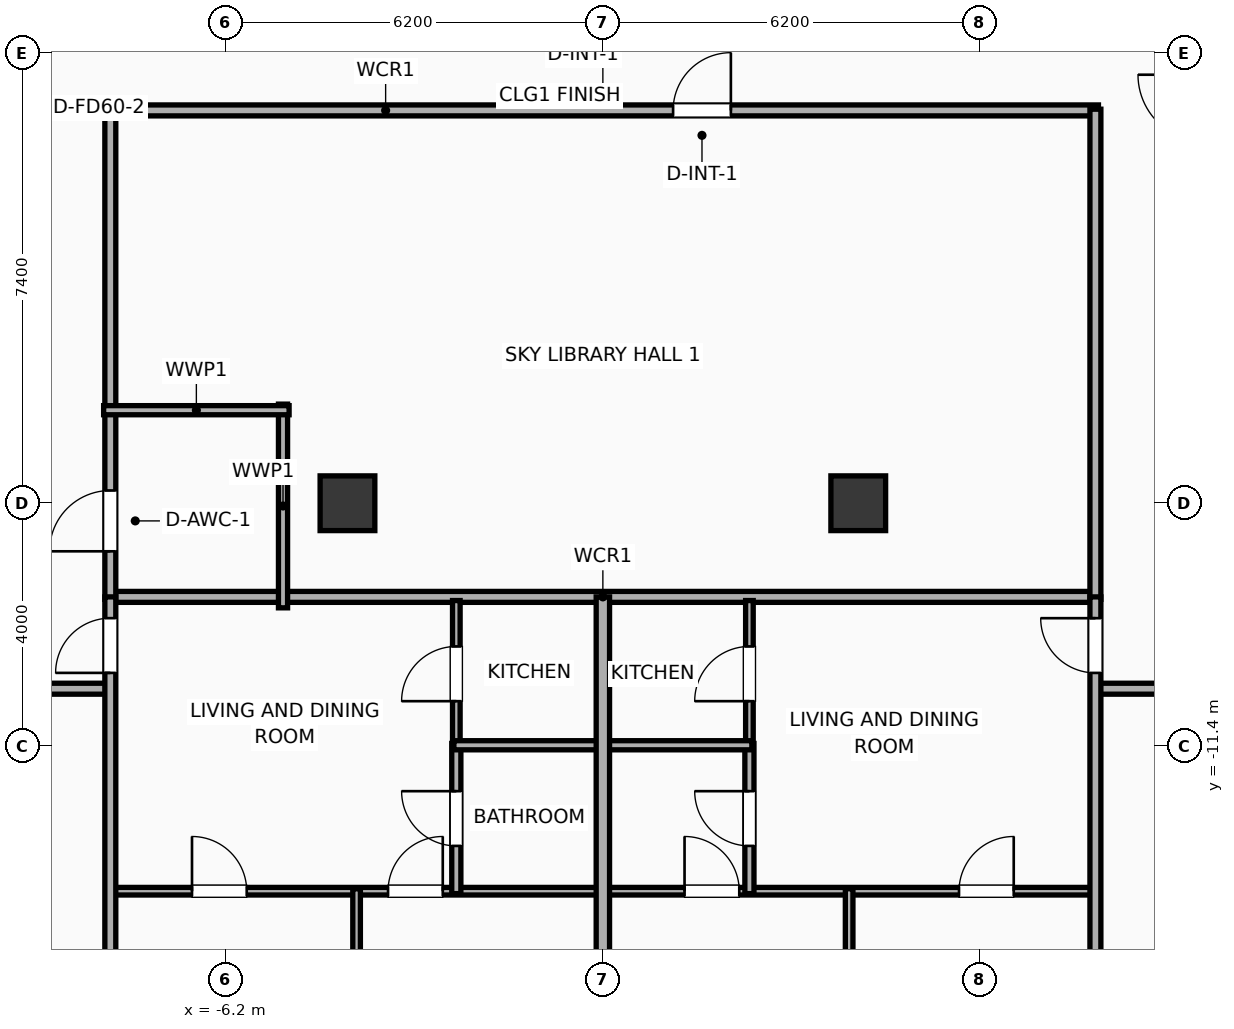
"""IFC4 building model, lengths in metres.
Left out: names, types, materials, properties, quantities, classifications, styles, units other than length and angle.
Written with IfcOpenShell. Run it as: python <this file> out.ifc"""

import sys

from ifc_helpers import new_model, si_unit, direction, frame, frame_2d, origin, origin_2d, place, context, subcontext, project, spatial, rectangle, extrude, element, fill, save


model = new_model("IFC4")
c1 = context("Model", 3, precision=1e-05, world=origin(), true_north=direction((0.0, 1.0)))
c2 = subcontext(c1, "Body", "Model", "MODEL_VIEW")
j1 = project(units=[si_unit("LENGTHUNIT", "METRE"), si_unit("PLANEANGLEUNIT", "RADIAN")], contexts=[c1])
p1 = place(None, origin())
s1 = spatial("IfcSite", under=j1, at=p1, CompositionType="ELEMENT")
p2 = place(p1, origin())
s2 = spatial("IfcBuilding", under=s1, at=p2, CompositionType="ELEMENT")
p3 = place(p2, frame((0.0, 0.0, 159.9)))
s3 = spatial("IfcBuildingStorey", under=s2, at=p3, CompositionType="ELEMENT", Elevation=159.9)
for number, where, z_axis, x_axis in (
    (1, (-4.2, -7.4, 0.0), (0.0, 0.0, 1.0), (1.0, 0.0, 0.0)),
    (2, (4.2, -7.4, 0.0), (0.0, 0.0, 1.0), (1.0, 0.0, 0.0)),
):
    element("IfcColumn", number, at=place(p3, frame(where, z_axis=z_axis, x_axis=x_axis)), inside=s3, PredefinedType="COLUMN", context=c2, shape_type="SweptSolid", body=[
        extrude(rectangle(XDim=0.9, YDim=0.9, at=origin_2d()), origin(), (0.0, 0.0, 1.0), 3.9),
    ])
p4 = place(p3, frame((-8.15, -8.94, 0.0), z_axis=(0.0, 0.0, 1.0), x_axis=(1.0, 0.0, 0.0)))
e3 = element("IfcWall", 3, at=p4, inside=s3, PredefinedType="PARTITIONING", context=c2, shape_type="SweptSolid", body=[
    extrude(rectangle(XDim=16.3, YDim=0.18, at=frame_2d((8.15, 0.0))), origin(), (0.0, 0.0, 1.0), 3.65),
])
p5 = place(p3, frame((-8.15, -0.94, 0.0), z_axis=(0.0, 0.0, 1.0), x_axis=(1.0, 0.0, 0.0)))
e4 = element("IfcWall", 4, at=p5, inside=s3, PredefinedType="PARTITIONING", context=c2, shape_type="SweptSolid", body=[
    extrude(rectangle(XDim=16.3, YDim=0.18, at=frame_2d((8.15, 0.0))), origin(), (0.0, 0.0, 1.0), 3.65),
])
p6 = place(p5, frame((9.305, 0.0, 0.0)))
e5 = element("IfcOpeningElement", 5, at=p6, cuts=e4, PredefinedType="OPENING", context=c2, shape_type="SweptSolid", body=[
    extrude(rectangle(XDim=0.95, YDim=2.05, at=frame_2d((0.475, 1.025))), frame((0.0, 0.1, 0.0), z_axis=(0.0, -1.0, 0.0), x_axis=(1.0, 0.0, 0.0)), (0.0, 0.0, 1.0), 0.2),
])
p7 = place(p3, frame((-8.1, -8.98, 0.0), z_axis=(0.0, 0.0, 1.0), x_axis=(0.0, 1.0, 0.0)))
e6 = element("IfcWall", 6, at=p7, inside=s3, PredefinedType="PARTITIONING", context=c2, shape_type="SweptSolid", body=[
    extrude(rectangle(XDim=8.06, YDim=0.18, at=frame_2d((4.03, 0.0))), origin(), (0.0, 0.0, 1.0), 3.65),
])
p8 = place(p7, frame((0.79, 0.0, 0.0)))
e7 = element("IfcOpeningElement", 7, at=p8, cuts=e6, PredefinedType="OPENING", context=c2, shape_type="SweptSolid", body=[
    extrude(rectangle(XDim=1.0, YDim=2.05, at=frame_2d((0.5, 1.025))), frame((0.0, 0.1, 0.0), z_axis=(0.0, -1.0, 0.0), x_axis=(1.0, 0.0, 0.0)), (0.0, 0.0, 1.0), 0.2),
])
p9 = place(p3, frame((8.1, -8.98, 0.0), z_axis=(0.0, 0.0, 1.0), x_axis=(0.0, 1.0, 0.0)))
e8 = element("IfcWall", 8, at=p9, inside=s3, PredefinedType="PARTITIONING", context=c2, shape_type="SweptSolid", body=[
    extrude(rectangle(XDim=8.06, YDim=0.18, at=frame_2d((4.03, 0.0))), origin(), (0.0, 0.0, 1.0), 3.65),
])
p10 = place(p3, frame((-5.26, -9.12, 0.0), z_axis=(0.0, 0.0, 1.0), x_axis=(0.0, 1.0, 0.0)))
e9 = element("IfcWall", 9, at=p10, inside=s3, PredefinedType="PLUMBINGWALL", context=c2, shape_type="SweptSolid", body=[
    extrude(rectangle(XDim=3.35, YDim=0.15, at=frame_2d((1.675, 0.0))), origin(), (0.0, 0.0, 1.0), 3.65),
])
p11 = place(p3, frame((-8.21, -5.87, 0.0), z_axis=(0.0, 0.0, 1.0), x_axis=(1.0, 0.0, 0.0)))
e10 = element("IfcWall", 10, at=p11, inside=s3, PredefinedType="PLUMBINGWALL", context=c2, shape_type="SweptSolid", body=[
    extrude(rectangle(XDim=3.05, YDim=0.15, at=frame_2d((1.525, 0.0))), origin(), (0.0, 0.0, 1.0), 3.65),
])
p12 = place(p3, frame((-19.75, -10.45, 0.0), z_axis=(0.0, 0.0, 1.0), x_axis=(1.0, 0.0, 0.0)))
e11 = element("IfcWall", 11, at=p12, inside=s3, PredefinedType="PARTITIONING", context=c2, shape_type="SweptSolid", body=[
    extrude(rectangle(XDim=11.67, YDim=0.18, at=frame_2d((5.835, 0.0))), origin(), (0.0, 0.0, 1.0), 3.65),
])
p13 = place(p12, frame((2.664, 0.0, 0.0)))
e12 = element("IfcOpeningElement", 12, at=p13, cuts=e11, PredefinedType="OPENING", context=c2, shape_type="SweptSolid", body=[
    extrude(rectangle(XDim=0.9, YDim=2.05, at=frame_2d((0.45, 1.025))), frame((0.0, 0.1, 0.0), z_axis=(0.0, -1.0, 0.0), x_axis=(1.0, 0.0, 0.0)), (0.0, 0.0, 1.0), 0.2),
])
p14 = place(p12, frame((9.404, 0.0, 0.0)))
e13 = element("IfcOpeningElement", 13, at=p14, cuts=e11, PredefinedType="OPENING", context=c2, shape_type="SweptSolid", body=[
    extrude(rectangle(XDim=1.15, YDim=2.05, at=frame_2d((0.575, 1.025))), frame((0.0, 0.1, 0.0), z_axis=(0.0, -1.0, 0.0), x_axis=(1.0, 0.0, 0.0)), (0.0, 0.0, 1.0), 0.2),
])
p15 = place(p3, frame((8.08, -10.45, 0.0), z_axis=(0.0, 0.0, 1.0), x_axis=(1.0, 0.0, 0.0)))
e14 = element("IfcWall", 14, at=p15, inside=s3, PredefinedType="PARTITIONING", context=c2, shape_type="SweptSolid", body=[
    extrude(rectangle(XDim=11.67, YDim=0.18, at=frame_2d((5.835, 0.0))), origin(), (0.0, 0.0, 1.0), 3.65),
])
p16 = place(p15, frame((1.213, 0.0, 0.0)))
e15 = element("IfcOpeningElement", 15, at=p16, cuts=e14, PredefinedType="OPENING", context=c2, shape_type="SweptSolid", body=[
    extrude(rectangle(XDim=1.15, YDim=2.05, at=frame_2d((0.575, 1.025))), frame((0.0, 0.1, 0.0), z_axis=(0.0, -1.0, 0.0), x_axis=(1.0, 0.0, 0.0)), (0.0, 0.0, 1.0), 0.2),
])
p17 = place(p15, frame((7.057, 0.0, 0.0)))
e16 = element("IfcOpeningElement", 16, at=p17, cuts=e14, PredefinedType="OPENING", context=c2, shape_type="SweptSolid", body=[
    extrude(rectangle(XDim=1.15, YDim=2.05, at=frame_2d((0.575, 1.025))), frame((0.0, 0.1, 0.0), z_axis=(0.0, -1.0, 0.0), x_axis=(1.0, 0.0, 0.0)), (0.0, 0.0, 1.0), 0.2),
])
p18 = place(p3, frame((-8.08, -13.78, 0.0), z_axis=(0.0, 0.0, 1.0), x_axis=(1.0, 0.0, 0.0)))
e17 = element("IfcWall", 17, at=p18, inside=s3, PredefinedType="PARTITIONING", context=c2, shape_type="SweptSolid", body=[
    extrude(rectangle(XDim=8.06, YDim=0.125, at=frame_2d((4.03, 0.0))), origin(), (0.0, 0.0, 1.0), 3.65),
])
p19 = place(p18, frame((1.323, 0.0, 0.0)))
e18 = element("IfcOpeningElement", 18, at=p19, cuts=e17, PredefinedType="OPENING", context=c2, shape_type="SweptSolid", body=[
    extrude(rectangle(XDim=0.9, YDim=2.05, at=frame_2d((0.45, 1.025))), frame((0.0, 0.073, 0.0), z_axis=(0.0, -1.0, 0.0), x_axis=(1.0, 0.0, 0.0)), (0.0, 0.0, 1.0), 0.145),
])
p20 = place(p18, frame((4.547, 0.0, 0.0)))
e19 = element("IfcOpeningElement", 19, at=p20, cuts=e17, PredefinedType="OPENING", context=c2, shape_type="SweptSolid", body=[
    extrude(rectangle(XDim=0.9, YDim=2.05, at=frame_2d((0.45, 1.025))), frame((0.0, 0.073, 0.0), z_axis=(0.0, -1.0, 0.0), x_axis=(1.0, 0.0, 0.0)), (0.0, 0.0, 1.0), 0.145),
])
p21 = place(p3, frame((-2.41, -11.41, 0.0), z_axis=(0.0, 0.0, 1.0), x_axis=(0.0, 1.0, 0.0)))
e20 = element("IfcWall", 20, at=p21, inside=s3, PredefinedType="PARTITIONING", context=c2, shape_type="SweptSolid", body=[
    extrude(rectangle(XDim=2.41, YDim=0.125, at=frame_2d((1.205, 0.0))), origin(), (0.0, 0.0, 1.0), 3.65),
])
p22 = place(p21, frame((0.755, 0.0, 0.0)))
e21 = element("IfcOpeningElement", 21, at=p22, cuts=e20, PredefinedType="OPENING", context=c2, shape_type="SweptSolid", body=[
    extrude(rectangle(XDim=0.9, YDim=2.05, at=frame_2d((0.45, 1.025))), frame((0.0, 0.073, 0.0), z_axis=(0.0, -1.0, 0.0), x_axis=(1.0, 0.0, 0.0)), (0.0, 0.0, 1.0), 0.145),
])
p23 = place(p3, frame((-2.41, -13.82, 0.0), z_axis=(0.0, 0.0, 1.0), x_axis=(0.0, 1.0, 0.0)))
e22 = element("IfcWall", 22, at=p23, inside=s3, PredefinedType="PLUMBINGWALL", context=c2, shape_type="SweptSolid", body=[
    extrude(rectangle(XDim=2.47, YDim=0.15, at=frame_2d((1.235, 0.0))), origin(), (0.0, 0.0, 1.0), 3.65),
])
p24 = place(p23, frame((0.785, 0.0, 0.0)))
e23 = element("IfcOpeningElement", 23, at=p24, cuts=e22, PredefinedType="OPENING", context=c2, shape_type="SweptSolid", body=[
    extrude(rectangle(XDim=0.9, YDim=2.05, at=frame_2d((0.45, 1.025))), frame((0.0, 0.085, 0.0), z_axis=(0.0, -1.0, 0.0), x_axis=(1.0, 0.0, 0.0)), (0.0, 0.0, 1.0), 0.17),
])
p25 = place(p3, frame((-2.45, -11.38, 0.0), z_axis=(0.0, 0.0, 1.0), x_axis=(1.0, 0.0, 0.0)))
e24 = element("IfcWall", 24, at=p25, inside=s3, PredefinedType="PLUMBINGWALL", context=c2, shape_type="SweptSolid", body=[
    extrude(rectangle(XDim=2.43, YDim=0.15, at=frame_2d((1.215, 0.0))), origin(), (0.0, 0.0, 1.0), 3.65),
])
p26 = place(p3, frame((-4.05, -21.031, 0.0), z_axis=(0.0, 0.0, 1.0), x_axis=(0.0, 1.0, 0.0)))
e25 = element("IfcWall", 25, at=p26, inside=s3, PredefinedType="PARTITIONING", context=c2, shape_type="SweptSolid", body=[
    extrude(rectangle(XDim=7.291, YDim=0.125, at=frame_2d((3.646, 0.0))), origin(), (0.0, 0.0, 1.0), 3.65),
])
p27 = place(p3, frame((-8.1, -21.456, 0.0), z_axis=(0.0, 0.0, 1.0), x_axis=(0.0, 1.0, 0.0)))
e26 = element("IfcWall", 26, at=p27, inside=s3, PredefinedType="PARTITIONING", context=c2, shape_type="SweptSolid", body=[
    extrude(rectangle(XDim=12.516, YDim=0.18, at=frame_2d((6.258, 0.0))), origin(), (0.0, 0.0, 1.0), 3.65),
])
p28 = place(p27, frame((11.267, 0.0, 0.0)))
e27 = element("IfcOpeningElement", 27, at=p28, cuts=e26, PredefinedType="OPENING", context=c2, shape_type="SweptSolid", body=[
    extrude(rectangle(XDim=0.9, YDim=2.05, at=frame_2d((0.45, 1.025))), frame((0.0, 0.1, 0.0), z_axis=(0.0, -1.0, 0.0), x_axis=(1.0, 0.0, 0.0)), (0.0, 0.0, 1.0), 0.2),
])
p29 = place(p3, frame((0.02, -13.78, 0.0), z_axis=(0.0, 0.0, 1.0), x_axis=(1.0, 0.0, 0.0)))
e28 = element("IfcWall", 28, at=p29, inside=s3, PredefinedType="PARTITIONING", context=c2, shape_type="SweptSolid", body=[
    extrude(rectangle(XDim=8.06, YDim=0.125, at=frame_2d((4.03, 0.0))), origin(), (0.0, 0.0, 1.0), 3.65),
])
p30 = place(p29, frame((1.323, 0.0, 0.0)))
e29 = element("IfcOpeningElement", 29, at=p30, cuts=e28, PredefinedType="OPENING", context=c2, shape_type="SweptSolid", body=[
    extrude(rectangle(XDim=0.9, YDim=2.05, at=frame_2d((0.45, 1.025))), frame((0.0, 0.073, 0.0), z_axis=(0.0, -1.0, 0.0), x_axis=(1.0, 0.0, 0.0)), (0.0, 0.0, 1.0), 0.145),
])
p31 = place(p29, frame((5.837, 0.0, 0.0)))
e30 = element("IfcOpeningElement", 30, at=p31, cuts=e28, PredefinedType="OPENING", context=c2, shape_type="SweptSolid", body=[
    extrude(rectangle(XDim=0.9, YDim=2.05, at=frame_2d((0.45, 1.025))), frame((0.0, 0.073, 0.0), z_axis=(0.0, -1.0, 0.0), x_axis=(1.0, 0.0, 0.0)), (0.0, 0.0, 1.0), 0.145),
])
p32 = place(p3, frame((2.41, -11.41, 0.0), z_axis=(0.0, 0.0, 1.0), x_axis=(0.0, 1.0, 0.0)))
e31 = element("IfcWall", 31, at=p32, inside=s3, PredefinedType="PARTITIONING", context=c2, shape_type="SweptSolid", body=[
    extrude(rectangle(XDim=2.41, YDim=0.125, at=frame_2d((1.205, 0.0))), origin(), (0.0, 0.0, 1.0), 3.65),
])
p33 = place(p32, frame((0.755, 0.0, 0.0)))
e32 = element("IfcOpeningElement", 32, at=p33, cuts=e31, PredefinedType="OPENING", context=c2, shape_type="SweptSolid", body=[
    extrude(rectangle(XDim=0.9, YDim=2.05, at=frame_2d((0.45, 1.025))), frame((0.0, 0.073, 0.0), z_axis=(0.0, -1.0, 0.0), x_axis=(1.0, 0.0, 0.0)), (0.0, 0.0, 1.0), 0.145),
])
p34 = place(p3, frame((2.41, -13.82, 0.0), z_axis=(0.0, 0.0, 1.0), x_axis=(0.0, 1.0, 0.0)))
e33 = element("IfcWall", 33, at=p34, inside=s3, PredefinedType="PLUMBINGWALL", context=c2, shape_type="SweptSolid", body=[
    extrude(rectangle(XDim=2.47, YDim=0.15, at=frame_2d((1.235, 0.0))), origin(), (0.0, 0.0, 1.0), 3.65),
])
p35 = place(p34, frame((0.785, 0.0, 0.0)))
e34 = element("IfcOpeningElement", 34, at=p35, cuts=e33, PredefinedType="OPENING", context=c2, shape_type="SweptSolid", body=[
    extrude(rectangle(XDim=0.9, YDim=2.05, at=frame_2d((0.45, 1.025))), frame((0.0, 0.085, 0.0), z_axis=(0.0, -1.0, 0.0), x_axis=(1.0, 0.0, 0.0)), (0.0, 0.0, 1.0), 0.17),
])
p36 = place(p3, frame((0.02, -11.38, 0.0), z_axis=(0.0, 0.0, 1.0), x_axis=(1.0, 0.0, 0.0)))
e35 = element("IfcWall", 35, at=p36, inside=s3, PredefinedType="PLUMBINGWALL", context=c2, shape_type="SweptSolid", body=[
    extrude(rectangle(XDim=2.43, YDim=0.15, at=frame_2d((1.215, 0.0))), origin(), (0.0, 0.0, 1.0), 3.65),
])
p37 = place(p3, frame((4.05, -20.179, 0.0), z_axis=(0.0, 0.0, 1.0), x_axis=(0.0, 1.0, 0.0)))
e36 = element("IfcWall", 36, at=p37, inside=s3, PredefinedType="PARTITIONING", context=c2, shape_type="SweptSolid", body=[
    extrude(rectangle(XDim=6.439, YDim=0.125, at=frame_2d((3.22, 0.0))), origin(), (0.0, 0.0, 1.0), 3.04),
])
p38 = place(p3, frame((8.1, -19.754, 0.0), z_axis=(0.0, 0.0, 1.0), x_axis=(0.0, 1.0, 0.0)))
e37 = element("IfcWall", 37, at=p38, inside=s3, PredefinedType="PARTITIONING", context=c2, shape_type="SweptSolid", body=[
    extrude(rectangle(XDim=10.814, YDim=0.18, at=frame_2d((5.407, 0.0))), origin(), (0.0, 0.0, 1.0), 3.65),
])
p39 = place(p38, frame((9.564, 0.0, 0.0)))
e38 = element("IfcOpeningElement", 38, at=p39, cuts=e37, PredefinedType="OPENING", context=c2, shape_type="SweptSolid", body=[
    extrude(rectangle(XDim=0.9, YDim=2.05, at=frame_2d((0.45, 1.025))), frame((0.0, 0.1, 0.0), z_axis=(0.0, -1.0, 0.0), x_axis=(1.0, 0.0, 0.0)), (0.0, 0.0, 1.0), 0.2),
])
p40 = place(p3, frame((0.0, -20.605, 0.0), z_axis=(0.0, 0.0, 1.0), x_axis=(0.0, 1.0, 0.0)))
e39 = element("IfcWall", 39, at=p40, inside=s3, PredefinedType="PARTITIONING", context=c2, shape_type="SweptSolid", body=[
    extrude(rectangle(XDim=11.665, YDim=0.22, at=frame_2d((5.833, 0.0))), origin(), (0.0, 0.0, 1.0), 3.65),
])
p41 = place(p6, origin())
e40 = element("IfcDoor", 40, at=p41, inside=s3, OperationType="SINGLE_SWING_RIGHT", PredefinedType="DOOR", context=c2, shape_type="SweptSolid", body=[
    extrude(rectangle(XDim=0.95, YDim=2.05, at=frame_2d((0.475, 1.025))), frame((0.0, 0.025, 0.0), z_axis=(0.0, -1.0, 0.0), x_axis=(1.0, 0.0, 0.0)), (0.0, 0.0, 1.0), 0.05),
])
fill(e5, e40)
p42 = place(p8, origin())
e41 = element("IfcDoor", 41, at=p42, inside=s3, OperationType="SINGLE_SWING_LEFT", PredefinedType="DOOR", context=c2, shape_type="SweptSolid", body=[
    extrude(rectangle(XDim=1.0, YDim=2.05, at=frame_2d((0.5, 1.025))), frame((0.0, 0.025, 0.0), z_axis=(0.0, -1.0, 0.0), x_axis=(1.0, 0.0, 0.0)), (0.0, 0.0, 1.0), 0.05),
])
fill(e7, e41)
p43 = place(p19, origin())
e42 = element("IfcDoor", 42, at=p43, inside=s3, OperationType="SINGLE_SWING_LEFT", PredefinedType="DOOR", context=c2, shape_type="SweptSolid", body=[
    extrude(rectangle(XDim=0.9, YDim=2.05, at=frame_2d((0.45, 1.025))), frame((0.0, 0.025, 0.0), z_axis=(0.0, -1.0, 0.0), x_axis=(1.0, 0.0, 0.0)), (0.0, 0.0, 1.0), 0.05),
])
fill(e18, e42)
p44 = place(p20, origin())
e43 = element("IfcDoor", 43, at=p44, inside=s3, OperationType="SINGLE_SWING_RIGHT", PredefinedType="DOOR", context=c2, shape_type="SweptSolid", body=[
    extrude(rectangle(XDim=0.9, YDim=2.05, at=frame_2d((0.45, 1.025))), frame((0.0, 0.025, 0.0), z_axis=(0.0, -1.0, 0.0), x_axis=(1.0, 0.0, 0.0)), (0.0, 0.0, 1.0), 0.05),
])
fill(e19, e43)
p45 = place(p22, origin())
e44 = element("IfcDoor", 44, at=p45, inside=s3, OperationType="SINGLE_SWING_LEFT", PredefinedType="DOOR", context=c2, shape_type="SweptSolid", body=[
    extrude(rectangle(XDim=0.9, YDim=2.05, at=frame_2d((0.45, 1.025))), frame((0.0, 0.025, 0.0), z_axis=(0.0, -1.0, 0.0), x_axis=(1.0, 0.0, 0.0)), (0.0, 0.0, 1.0), 0.05),
])
fill(e21, e44)
p46 = place(p24, origin())
e45 = element("IfcDoor", 45, at=p46, inside=s3, OperationType="SINGLE_SWING_RIGHT", PredefinedType="DOOR", context=c2, shape_type="SweptSolid", body=[
    extrude(rectangle(XDim=0.9, YDim=2.05, at=frame_2d((0.45, 1.025))), frame((0.0, 0.025, 0.0), z_axis=(0.0, -1.0, 0.0), x_axis=(1.0, 0.0, 0.0)), (0.0, 0.0, 1.0), 0.05),
])
fill(e23, e45)
p47 = place(p28, origin())
e46 = element("IfcDoor", 46, at=p47, inside=s3, OperationType="SINGLE_SWING_LEFT", PredefinedType="DOOR", context=c2, shape_type="SweptSolid", body=[
    extrude(rectangle(XDim=0.9, YDim=2.05, at=frame_2d((0.45, 1.025))), frame((0.0, 0.025, 0.0), z_axis=(0.0, -1.0, 0.0), x_axis=(1.0, 0.0, 0.0)), (0.0, 0.0, 1.0), 0.05),
])
fill(e27, e46)
p48 = place(p30, origin())
e47 = element("IfcDoor", 47, at=p48, inside=s3, OperationType="SINGLE_SWING_LEFT", PredefinedType="DOOR", context=c2, shape_type="SweptSolid", body=[
    extrude(rectangle(XDim=0.9, YDim=2.05, at=frame_2d((0.45, 1.025))), frame((0.0, 0.025, 0.0), z_axis=(0.0, -1.0, 0.0), x_axis=(1.0, 0.0, 0.0)), (0.0, 0.0, 1.0), 0.05),
])
fill(e29, e47)
p49 = place(p31, origin())
e48 = element("IfcDoor", 48, at=p49, inside=s3, OperationType="SINGLE_SWING_RIGHT", PredefinedType="DOOR", context=c2, shape_type="SweptSolid", body=[
    extrude(rectangle(XDim=0.9, YDim=2.05, at=frame_2d((0.45, 1.025))), frame((0.0, 0.025, 0.0), z_axis=(0.0, -1.0, 0.0), x_axis=(1.0, 0.0, 0.0)), (0.0, 0.0, 1.0), 0.05),
])
fill(e30, e48)
p50 = place(p33, origin())
e49 = element("IfcDoor", 49, at=p50, inside=s3, OperationType="SINGLE_SWING_LEFT", PredefinedType="DOOR", context=c2, shape_type="SweptSolid", body=[
    extrude(rectangle(XDim=0.9, YDim=2.05, at=frame_2d((0.45, 1.025))), frame((0.0, 0.025, 0.0), z_axis=(0.0, -1.0, 0.0), x_axis=(1.0, 0.0, 0.0)), (0.0, 0.0, 1.0), 0.05),
])
fill(e32, e49)
p51 = place(p35, origin())
e50 = element("IfcDoor", 50, at=p51, inside=s3, OperationType="SINGLE_SWING_RIGHT", PredefinedType="DOOR", context=c2, shape_type="SweptSolid", body=[
    extrude(rectangle(XDim=0.9, YDim=2.05, at=frame_2d((0.45, 1.025))), frame((0.0, 0.025, 0.0), z_axis=(0.0, -1.0, 0.0), x_axis=(1.0, 0.0, 0.0)), (0.0, 0.0, 1.0), 0.05),
])
fill(e34, e50)
p52 = place(p39, origin())
e51 = element("IfcDoor", 51, at=p52, inside=s3, OperationType="SINGLE_SWING_RIGHT", PredefinedType="DOOR", context=c2, shape_type="SweptSolid", body=[
    extrude(rectangle(XDim=0.9, YDim=2.05, at=frame_2d((0.45, 1.025))), frame((0.0, 0.025, 0.0), z_axis=(0.0, -1.0, 0.0), x_axis=(1.0, 0.0, 0.0)), (0.0, 0.0, 1.0), 0.05),
])
fill(e38, e51)
save(model, sys.argv[1])
